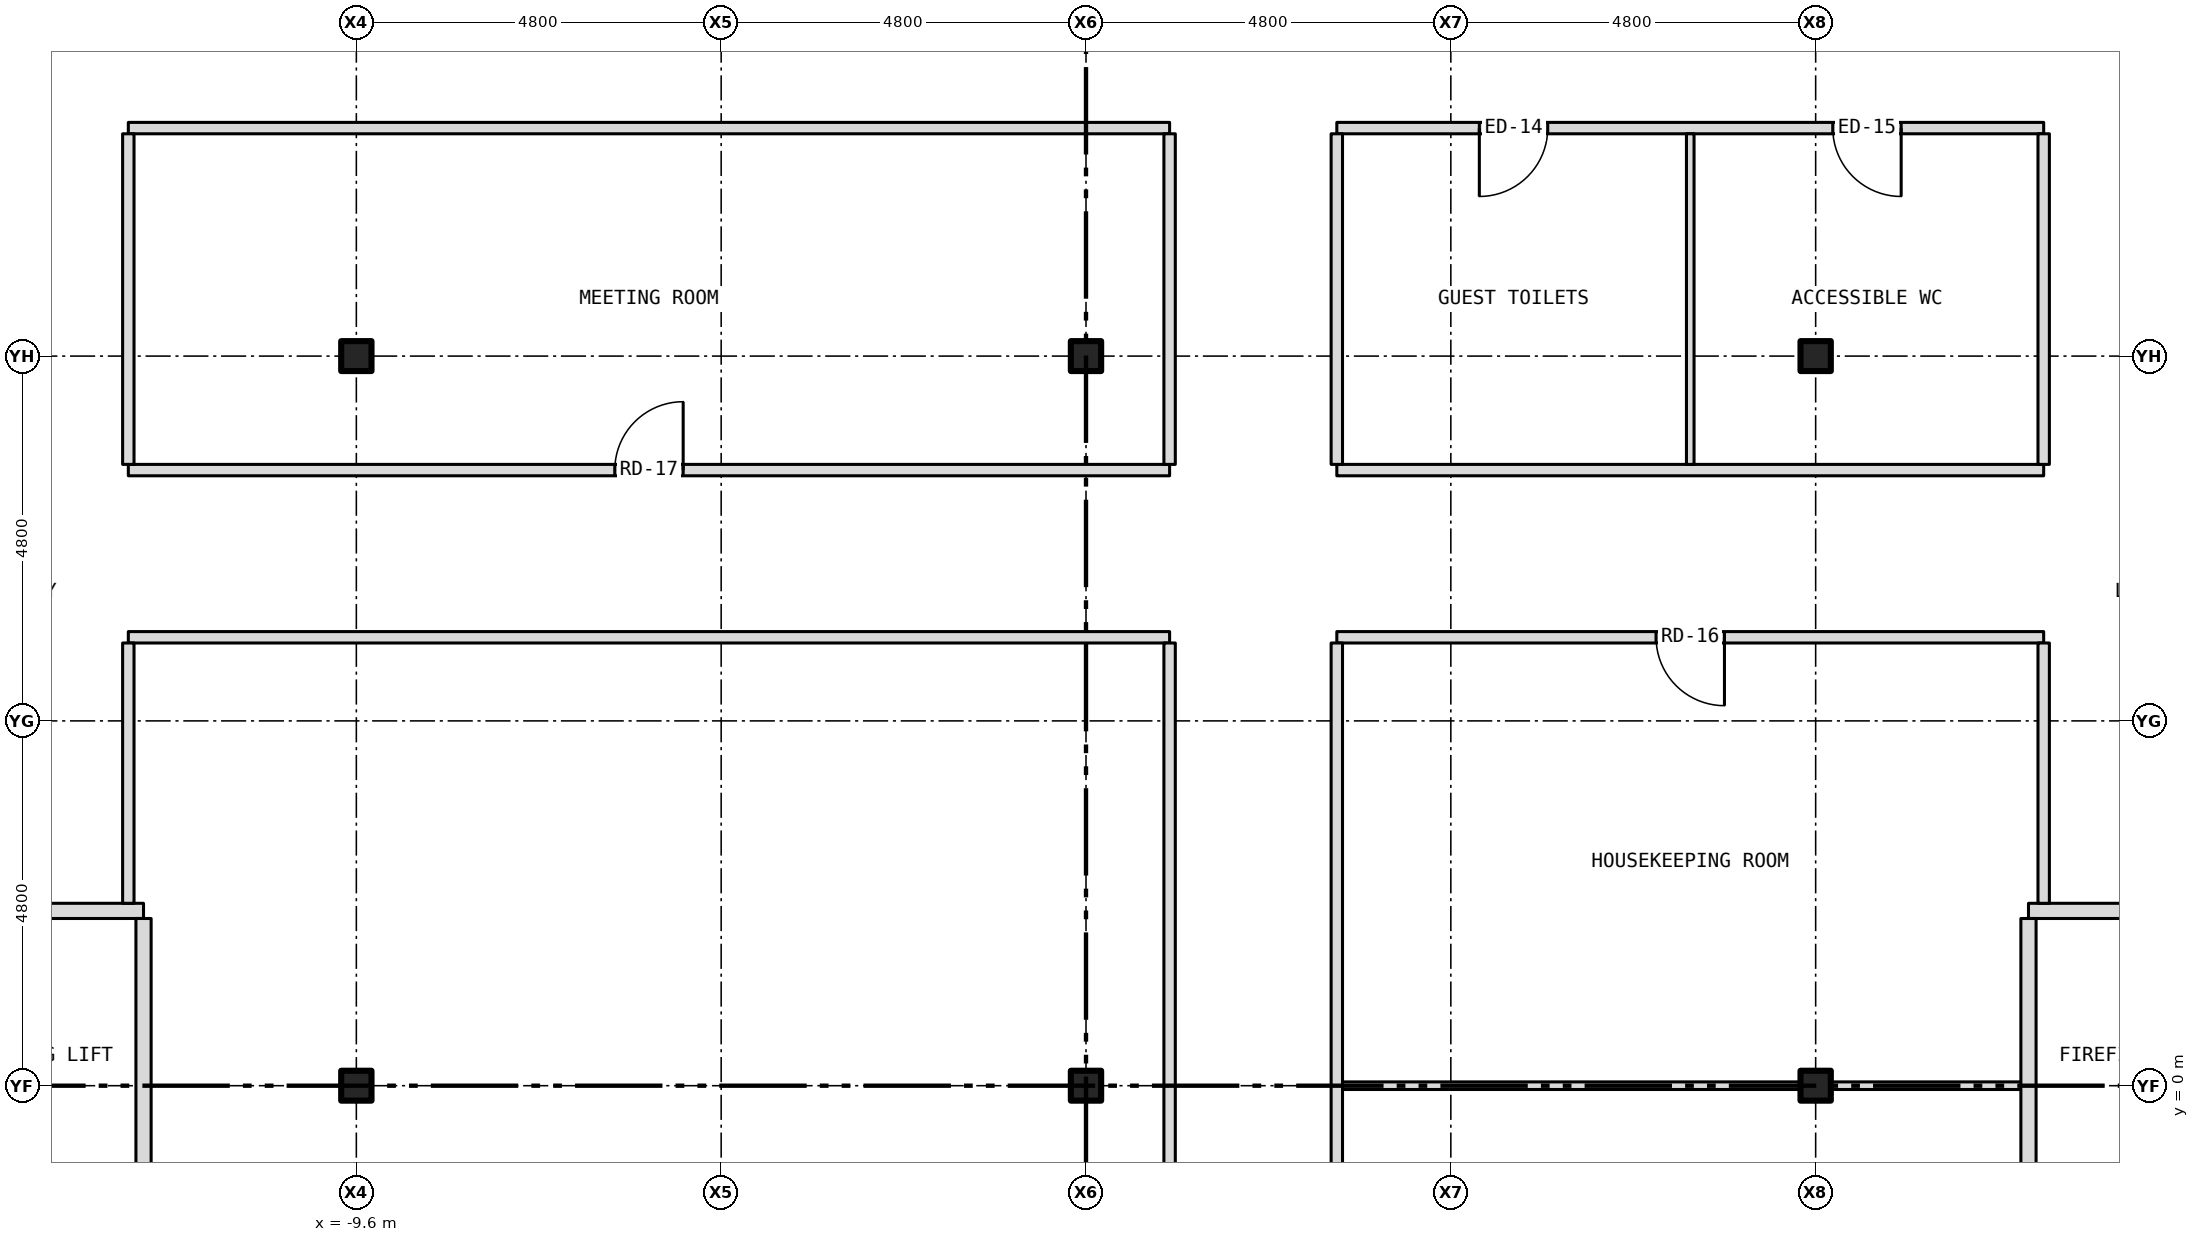
"""IFC4 building model, lengths in metres.
Left out: names, types, materials, properties, quantities, classifications, styles, units other than length and angle.
Written with IfcOpenShell. Run it as: python <this file> out.ifc"""

import sys

from ifc_helpers import new_model, si_unit, direction, frame, frame_2d, origin, origin_2d, place, context, subcontext, project, spatial, rectangle, i_section, extrude, element, fill, save


model = new_model("IFC4")
c1 = context("Model", 3, precision=1e-05, world=origin(), true_north=direction((0.0, 1.0)))
c2 = subcontext(c1, "Body", "Model", "MODEL_VIEW")
j1 = project(units=[si_unit("LENGTHUNIT", "METRE"), si_unit("PLANEANGLEUNIT", "RADIAN")], contexts=[c1])
p1 = place(None, origin())
s1 = spatial("IfcSite", under=j1, at=p1, CompositionType="ELEMENT")
p2 = place(p1, origin())
s2 = spatial("IfcBuilding", under=s1, at=p2, CompositionType="ELEMENT")
p3 = place(p2, frame((0.0, 0.0, 92.5)))
s3 = spatial("IfcBuildingStorey", under=s2, at=p3, CompositionType="ELEMENT", Elevation=92.5)
for number, where, z_axis, x_axis in (
    (1, (-9.6, 0.0, -0.15), (0.0, 0.0, 1.0), (1.0, 0.0, 0.0)),
    (2, (-9.6, 9.6, -0.15), (0.0, 0.0, 1.0), (1.0, 0.0, 0.0)),
    (3, (0.0, 0.0, -0.15), (0.0, 0.0, 1.0), (1.0, 0.0, 0.0)),
    (4, (0.0, 9.6, -0.15), (0.0, 0.0, 1.0), (1.0, 0.0, 0.0)),
    (5, (9.6, 0.0, -0.15), (0.0, 0.0, 1.0), (1.0, 0.0, 0.0)),
    (6, (9.6, 9.6, -0.15), (0.0, 0.0, 1.0), (1.0, 0.0, 0.0)),
):
    element("IfcColumn", number, at=place(p3, frame(where, z_axis=z_axis, x_axis=x_axis)), inside=s3, PredefinedType="COLUMN", context=c2, shape_type="SweptSolid", body=[
        extrude(i_section(OverallWidth=0.399, OverallDepth=0.394, WebThickness=0.023, FlangeThickness=0.037, at=origin_2d()), origin(), (0.0, 0.0, 1.0), 3.5),
    ])
p4 = place(p3, frame((3.3, 0.0, 0.0), z_axis=(0.0, 0.0, 1.0), x_axis=(1.0, 0.0, 0.0)))
e7 = element("IfcWall", 7, at=p4, inside=s3, PredefinedType="PARTITIONING", context=c2, shape_type="SweptSolid", body=[
    extrude(rectangle(XDim=6.101, YDim=0.1, at=frame_2d((3.05, 0.0))), origin(), (0.0, 0.0, 1.0), 2.728),
])
p5 = place(p3, frame((9.401, 0.0, 0.0), z_axis=(0.0, 0.0, 1.0), x_axis=(1.0, 0.0, 0.0)))
e8 = element("IfcWall", 8, at=p5, inside=s3, PredefinedType="PARTITIONING", context=c2, shape_type="SweptSolid", body=[
    extrude(rectangle(XDim=0.398, YDim=0.1, at=frame_2d((0.199, 0.0))), origin(), (0.0, 0.0, 1.0), 3.35),
])
p6 = place(p3, frame((9.799, 0.0, 0.0), z_axis=(0.0, 0.0, 1.0), x_axis=(1.0, 0.0, 0.0)))
e9 = element("IfcWall", 9, at=p6, inside=s3, PredefinedType="PARTITIONING", context=c2, shape_type="SweptSolid", body=[
    extrude(rectangle(XDim=2.601, YDim=0.1, at=frame_2d((1.3, 0.0))), origin(), (0.0, 0.0, 1.0), 2.728),
])
p7 = place(p3, frame((-15.68, 2.3, 0.0), z_axis=(0.0, 0.0, 1.0), x_axis=(1.0, 0.0, 0.0)))
e10 = element("IfcWall", 10, at=p7, inside=s3, PredefinedType="PARTITIONING", context=c2, shape_type="SweptSolid", body=[
    extrude(rectangle(XDim=3.28, YDim=0.2, at=frame_2d((1.64, 0.0))), origin(), (0.0, 0.0, 1.0), 3.35),
])
p8 = place(p7, frame((0.84, 0.0, 0.0)))
e11 = element("IfcOpeningElement", 11, at=p8, cuts=e10, PredefinedType="OPENING", context=c2, shape_type="SweptSolid", body=[
    extrude(rectangle(XDim=1.1, YDim=2.1, at=frame_2d((0.55, 1.05))), frame((0.0, 0.112, 0.0), z_axis=(0.0, -1.0, 0.0), x_axis=(1.0, 0.0, 0.0)), (0.0, 0.0, 1.0), 0.224),
])
p9 = place(p3, frame((12.4, 2.3, 0.0), z_axis=(0.0, 0.0, 1.0), x_axis=(1.0, 0.0, 0.0)))
e12 = element("IfcWall", 12, at=p9, inside=s3, PredefinedType="PARTITIONING", context=c2, shape_type="SweptSolid", body=[
    extrude(rectangle(XDim=3.28, YDim=0.2, at=frame_2d((1.64, 0.0))), origin(), (0.0, 0.0, 1.0), 3.35),
])
p10 = place(p9, frame((1.34, 0.0, 0.0)))
e13 = element("IfcOpeningElement", 13, at=p10, cuts=e12, PredefinedType="OPENING", context=c2, shape_type="SweptSolid", body=[
    extrude(rectangle(XDim=1.1, YDim=2.1, at=frame_2d((0.55, 1.05))), frame((0.0, 0.112, 0.0), z_axis=(0.0, -1.0, 0.0), x_axis=(1.0, 0.0, 0.0)), (0.0, 0.0, 1.0), 0.224),
])
p11 = place(p3, frame((-12.6, 5.9, 0.0), z_axis=(0.0, 0.0, 1.0), x_axis=(1.0, 0.0, 0.0)))
e14 = element("IfcWall", 14, at=p11, inside=s3, PredefinedType="PARTITIONING", context=c2, shape_type="SweptSolid", body=[
    extrude(rectangle(XDim=13.7, YDim=0.15, at=frame_2d((6.85, 0.0))), origin(), (0.0, 0.0, 1.0), 3.35),
])
p12 = place(p3, frame((3.3, 5.9, 0.0), z_axis=(0.0, 0.0, 1.0), x_axis=(1.0, 0.0, 0.0)))
e15 = element("IfcWall", 15, at=p12, inside=s3, PredefinedType="PARTITIONING", context=c2, shape_type="SweptSolid", body=[
    extrude(rectangle(XDim=9.3, YDim=0.15, at=frame_2d((4.65, 0.0))), origin(), (0.0, 0.0, 1.0), 3.35),
])
p13 = place(p12, frame((4.2, 0.0, 0.0)))
e16 = element("IfcOpeningElement", 16, at=p13, cuts=e15, PredefinedType="OPENING", context=c2, shape_type="SweptSolid", body=[
    extrude(rectangle(XDim=0.9, YDim=2.1, at=frame_2d((0.45, 1.05))), frame((0.0, 0.087, 0.0), z_axis=(0.0, -1.0, 0.0), x_axis=(1.0, 0.0, 0.0)), (0.0, 0.0, 1.0), 0.174),
])
p14 = place(p3, frame((-12.6, 8.1, 0.0), z_axis=(0.0, 0.0, 1.0), x_axis=(1.0, 0.0, 0.0)))
e17 = element("IfcWall", 17, at=p14, inside=s3, PredefinedType="PARTITIONING", context=c2, shape_type="SweptSolid", body=[
    extrude(rectangle(XDim=13.7, YDim=0.15, at=frame_2d((6.85, 0.0))), origin(), (0.0, 0.0, 1.0), 3.35),
])
p15 = place(p14, frame((6.4, 0.0, 0.0)))
e18 = element("IfcOpeningElement", 18, at=p15, cuts=e17, PredefinedType="OPENING", context=c2, shape_type="SweptSolid", body=[
    extrude(rectangle(XDim=0.9, YDim=2.1, at=frame_2d((0.45, 1.05))), frame((0.0, 0.087, 0.0), z_axis=(0.0, -1.0, 0.0), x_axis=(1.0, 0.0, 0.0)), (0.0, 0.0, 1.0), 0.174),
])
p16 = place(p3, frame((3.3, 8.1, 0.0), z_axis=(0.0, 0.0, 1.0), x_axis=(1.0, 0.0, 0.0)))
e19 = element("IfcWall", 19, at=p16, inside=s3, PredefinedType="PARTITIONING", context=c2, shape_type="SweptSolid", body=[
    extrude(rectangle(XDim=9.3, YDim=0.15, at=frame_2d((4.65, 0.0))), origin(), (0.0, 0.0, 1.0), 3.35),
])
p17 = place(p3, frame((-12.6, 12.6, 0.0), z_axis=(0.0, 0.0, 1.0), x_axis=(1.0, 0.0, 0.0)))
e20 = element("IfcWall", 20, at=p17, inside=s3, PredefinedType="PARTITIONING", context=c2, shape_type="SweptSolid", body=[
    extrude(rectangle(XDim=13.7, YDim=0.15, at=frame_2d((6.85, 0.0))), origin(), (0.0, 0.0, 1.0), 3.35),
])
p18 = place(p3, frame((3.3, 12.6, 0.0), z_axis=(0.0, 0.0, 1.0), x_axis=(1.0, 0.0, 0.0)))
e21 = element("IfcWall", 21, at=p18, inside=s3, PredefinedType="PARTITIONING", context=c2, shape_type="SweptSolid", body=[
    extrude(rectangle(XDim=9.3, YDim=0.15, at=frame_2d((4.65, 0.0))), origin(), (0.0, 0.0, 1.0), 3.35),
])
p19 = place(p18, frame((1.875, 0.0, 0.0)))
e22 = element("IfcOpeningElement", 22, at=p19, cuts=e21, PredefinedType="OPENING", context=c2, shape_type="SweptSolid", body=[
    extrude(rectangle(XDim=0.9, YDim=2.1, at=frame_2d((0.45, 1.05))), frame((0.0, 0.087, 0.0), z_axis=(0.0, -1.0, 0.0), x_axis=(1.0, 0.0, 0.0)), (0.0, 0.0, 1.0), 0.174),
])
p20 = place(p18, frame((6.525, 0.0, 0.0)))
e23 = element("IfcOpeningElement", 23, at=p20, cuts=e21, PredefinedType="OPENING", context=c2, shape_type="SweptSolid", body=[
    extrude(rectangle(XDim=0.9, YDim=2.1, at=frame_2d((0.45, 1.05))), frame((0.0, 0.087, 0.0), z_axis=(0.0, -1.0, 0.0), x_axis=(1.0, 0.0, 0.0)), (0.0, 0.0, 1.0), 0.174),
])
p21 = place(p3, frame((-12.6, 2.4, 0.0), z_axis=(0.0, 0.0, 1.0), x_axis=(0.0, 1.0, 0.0)))
e24 = element("IfcWall", 24, at=p21, inside=s3, PredefinedType="PARTITIONING", context=c2, shape_type="SweptSolid", body=[
    extrude(rectangle(XDim=3.425, YDim=0.15, at=frame_2d((1.712, 0.0))), origin(), (0.0, 0.0, 1.0), 3.35),
])
p22 = place(p3, frame((-12.6, 8.175, 0.0), z_axis=(0.0, 0.0, 1.0), x_axis=(0.0, 1.0, 0.0)))
e25 = element("IfcWall", 25, at=p22, inside=s3, PredefinedType="PARTITIONING", context=c2, shape_type="SweptSolid", body=[
    extrude(rectangle(XDim=4.35, YDim=0.15, at=frame_2d((2.175, 0.0))), origin(), (0.0, 0.0, 1.0), 3.35),
])
p23 = place(p3, frame((-12.4, -1.8, 0.0), z_axis=(0.0, 0.0, 1.0), x_axis=(0.0, 1.0, 0.0)))
e26 = element("IfcWall", 26, at=p23, inside=s3, PredefinedType="PARTITIONING", context=c2, shape_type="SweptSolid", body=[
    extrude(rectangle(XDim=4.0, YDim=0.2, at=frame_2d((2.0, 0.0))), origin(), (0.0, 0.0, 1.0), 3.35),
])
p24 = place(p3, frame((1.1, -12.525, 0.0), z_axis=(0.0, 0.0, 1.0), x_axis=(0.0, 1.0, 0.0)))
e27 = element("IfcWall", 27, at=p24, inside=s3, PredefinedType="PARTITIONING", context=c2, shape_type="SweptSolid", body=[
    extrude(rectangle(XDim=18.35, YDim=0.15, at=frame_2d((9.175, 0.0))), origin(), (0.0, 0.0, 1.0), 3.35),
])
p25 = place(p24, frame((8.725, 0.0, 0.0)))
e28 = element("IfcOpeningElement", 28, at=p25, cuts=e27, PredefinedType="OPENING", context=c2, shape_type="SweptSolid", body=[
    extrude(rectangle(XDim=0.9, YDim=2.1, at=frame_2d((0.45, 1.05))), frame((0.0, 0.087, 0.0), z_axis=(0.0, -1.0, 0.0), x_axis=(1.0, 0.0, 0.0)), (0.0, 0.0, 1.0), 0.174),
])
p26 = place(p3, frame((1.1, 8.175, 0.0), z_axis=(0.0, 0.0, 1.0), x_axis=(0.0, 1.0, 0.0)))
e29 = element("IfcWall", 29, at=p26, inside=s3, PredefinedType="PARTITIONING", context=c2, shape_type="SweptSolid", body=[
    extrude(rectangle(XDim=4.35, YDim=0.15, at=frame_2d((2.175, 0.0))), origin(), (0.0, 0.0, 1.0), 3.35),
])
p27 = place(p3, frame((3.3, -12.525, 0.0), z_axis=(0.0, 0.0, 1.0), x_axis=(0.0, 1.0, 0.0)))
e30 = element("IfcWall", 30, at=p27, inside=s3, PredefinedType="PARTITIONING", context=c2, shape_type="SweptSolid", body=[
    extrude(rectangle(XDim=18.35, YDim=0.15, at=frame_2d((9.175, 0.0))), origin(), (0.0, 0.0, 1.0), 3.35),
])
p28 = place(p27, frame((5.775, 0.0, 0.0)))
e31 = element("IfcOpeningElement", 31, at=p28, cuts=e30, PredefinedType="OPENING", context=c2, shape_type="SweptSolid", body=[
    extrude(rectangle(XDim=0.9, YDim=2.1, at=frame_2d((0.45, 1.05))), frame((0.0, 0.087, 0.0), z_axis=(0.0, -1.0, 0.0), x_axis=(1.0, 0.0, 0.0)), (0.0, 0.0, 1.0), 0.174),
])
p29 = place(p3, frame((3.3, 8.175, 0.0), z_axis=(0.0, 0.0, 1.0), x_axis=(0.0, 1.0, 0.0)))
e32 = element("IfcWall", 32, at=p29, inside=s3, PredefinedType="PARTITIONING", context=c2, shape_type="SweptSolid", body=[
    extrude(rectangle(XDim=4.35, YDim=0.15, at=frame_2d((2.175, 0.0))), origin(), (0.0, 0.0, 1.0), 3.35),
])
p30 = place(p3, frame((7.95, 8.175, 0.0), z_axis=(0.0, 0.0, 1.0), x_axis=(0.0, 1.0, 0.0)))
e33 = element("IfcWall", 33, at=p30, inside=s3, PredefinedType="PARTITIONING", context=c2, shape_type="SweptSolid", body=[
    extrude(rectangle(XDim=4.35, YDim=0.1, at=frame_2d((2.175, 0.0))), origin(), (0.0, 0.0, 1.0), 3.35),
])
p31 = place(p3, frame((12.4, -1.8, 0.0), z_axis=(0.0, 0.0, 1.0), x_axis=(0.0, 1.0, 0.0)))
e34 = element("IfcWall", 34, at=p31, inside=s3, PredefinedType="PARTITIONING", context=c2, shape_type="SweptSolid", body=[
    extrude(rectangle(XDim=4.0, YDim=0.2, at=frame_2d((2.0, 0.0))), origin(), (0.0, 0.0, 1.0), 3.35),
])
p32 = place(p3, frame((12.6, 2.4, 0.0), z_axis=(0.0, 0.0, 1.0), x_axis=(0.0, 1.0, 0.0)))
e35 = element("IfcWall", 35, at=p32, inside=s3, PredefinedType="PARTITIONING", context=c2, shape_type="SweptSolid", body=[
    extrude(rectangle(XDim=3.425, YDim=0.15, at=frame_2d((1.712, 0.0))), origin(), (0.0, 0.0, 1.0), 3.35),
])
p33 = place(p3, frame((12.6, 8.175, 0.0), z_axis=(0.0, 0.0, 1.0), x_axis=(0.0, 1.0, 0.0)))
e36 = element("IfcWall", 36, at=p33, inside=s3, PredefinedType="PARTITIONING", context=c2, shape_type="SweptSolid", body=[
    extrude(rectangle(XDim=4.35, YDim=0.15, at=frame_2d((2.175, 0.0))), origin(), (0.0, 0.0, 1.0), 3.35),
])
p34 = place(p19, origin())
e37 = element("IfcDoor", 37, at=p34, inside=s3, OperationType="SINGLE_SWING_LEFT", PredefinedType="DOOR", context=c2, shape_type="SweptSolid", body=[
    extrude(rectangle(XDim=0.9, YDim=2.1, at=frame_2d((0.45, 1.05))), frame((0.0, 0.025, 0.0), z_axis=(0.0, -1.0, 0.0), x_axis=(1.0, 0.0, 0.0)), (0.0, 0.0, 1.0), 0.05),
])
fill(e22, e37)
p35 = place(p20, origin())
e38 = element("IfcDoor", 38, at=p35, inside=s3, OperationType="SINGLE_SWING_RIGHT", PredefinedType="DOOR", context=c2, shape_type="SweptSolid", body=[
    extrude(rectangle(XDim=0.9, YDim=2.1, at=frame_2d((0.45, 1.05))), frame((0.0, 0.025, 0.0), z_axis=(0.0, -1.0, 0.0), x_axis=(1.0, 0.0, 0.0)), (0.0, 0.0, 1.0), 0.05),
])
fill(e23, e38)
p36 = place(p13, origin())
e39 = element("IfcDoor", 39, at=p36, inside=s3, OperationType="SINGLE_SWING_RIGHT", PredefinedType="DOOR", context=c2, shape_type="SweptSolid", body=[
    extrude(rectangle(XDim=0.9, YDim=2.1, at=frame_2d((0.45, 1.05))), frame((0.0, 0.025, 0.0), z_axis=(0.0, -1.0, 0.0), x_axis=(1.0, 0.0, 0.0)), (0.0, 0.0, 1.0), 0.05),
])
fill(e16, e39)
p37 = place(p15, origin())
e40 = element("IfcDoor", 40, at=p37, inside=s3, OperationType="SINGLE_SWING_RIGHT", PredefinedType="DOOR", context=c2, shape_type="SweptSolid", body=[
    extrude(rectangle(XDim=0.9, YDim=2.1, at=frame_2d((0.45, 1.05))), frame((0.0, 0.025, 0.0), z_axis=(0.0, -1.0, 0.0), x_axis=(1.0, 0.0, 0.0)), (0.0, 0.0, 1.0), 0.05),
])
fill(e18, e40)
save(model, sys.argv[1])
